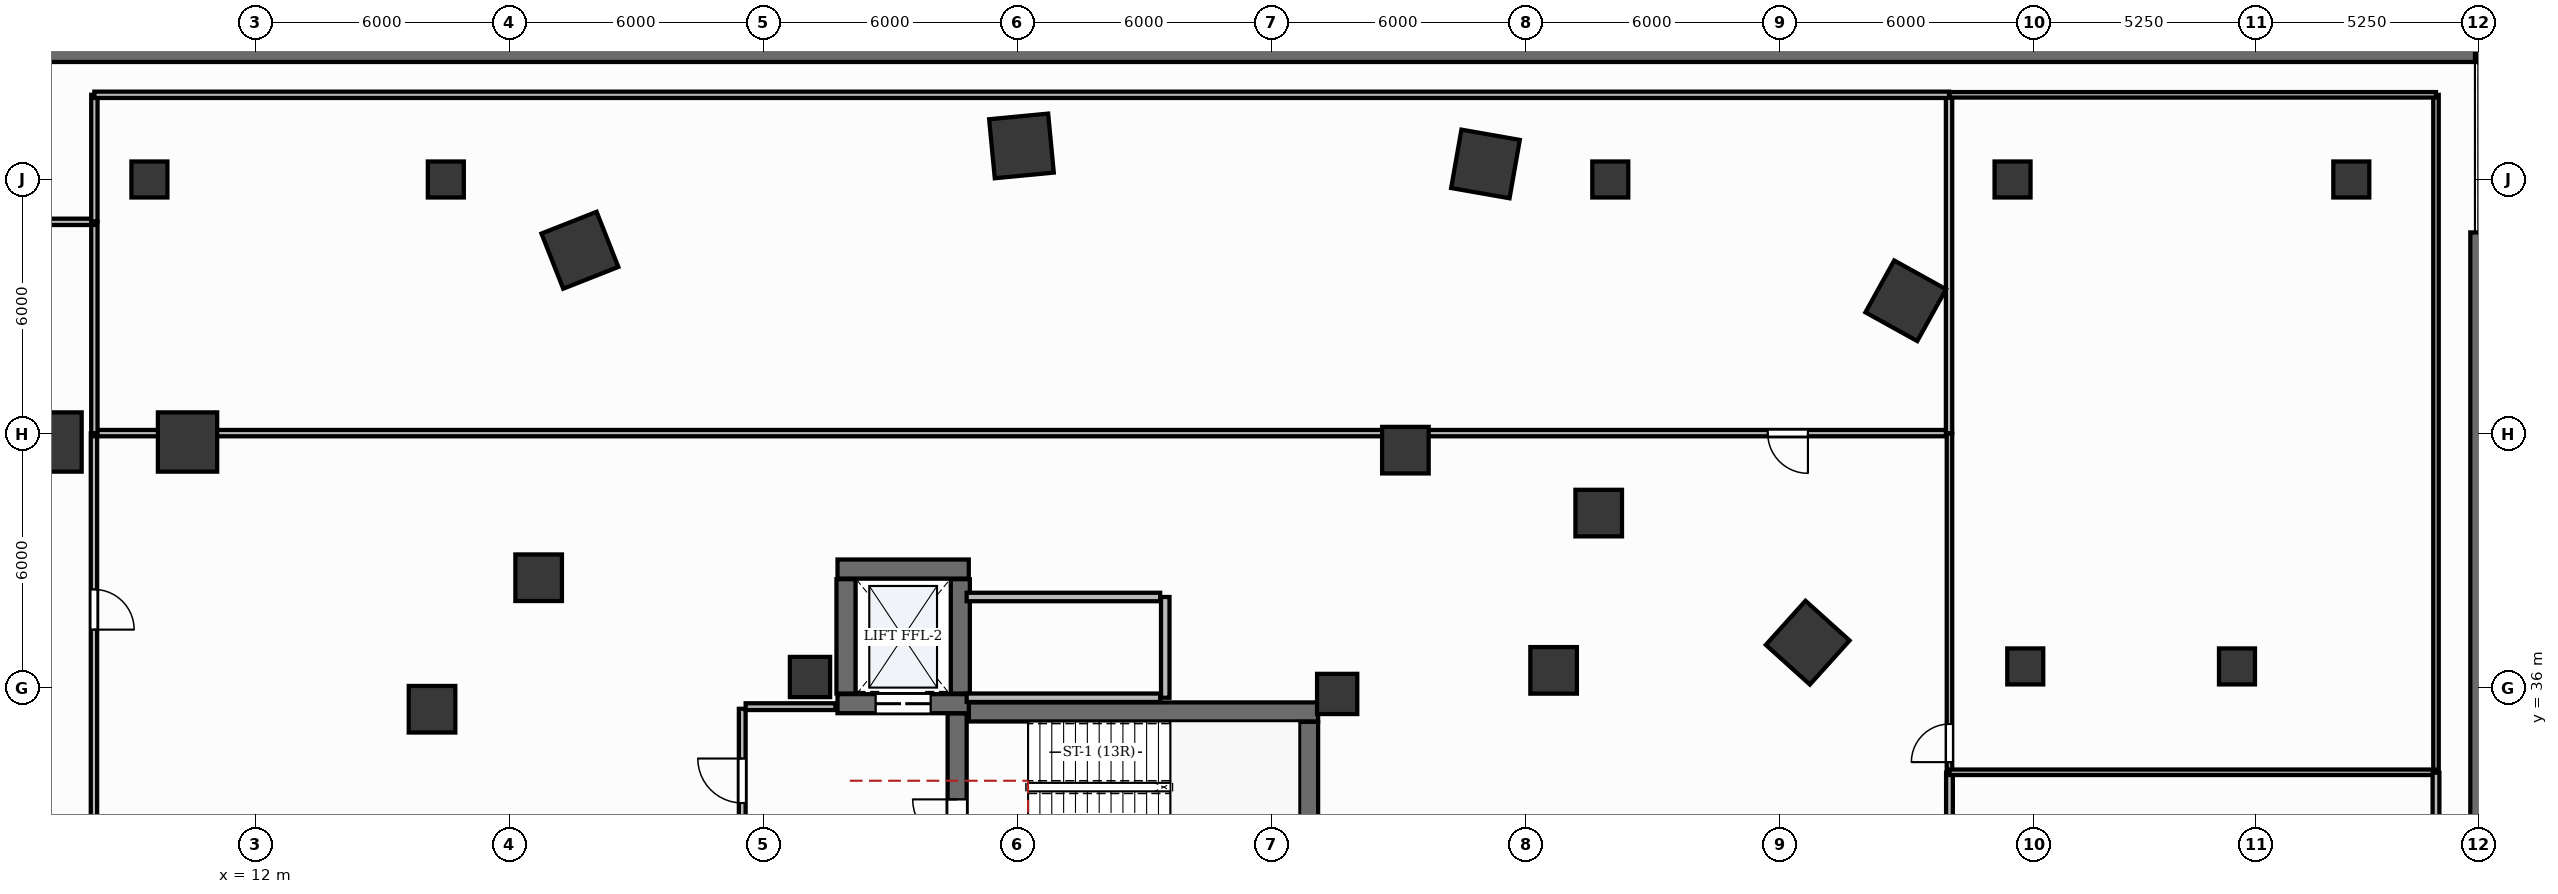
"""IFC4 building model, lengths in metres.
Left out: names, types, materials, properties, quantities, classifications, styles, units other than length and angle.
Written with IfcOpenShell. Run it as: python <this file> out.ifc"""

import sys

from ifc_helpers import new_model, si_unit, direction, frame, frame_2d, origin, origin_2d, place, context, subcontext, project, spatial, rectangle, extrude, element, fill, save


model = new_model("IFC4")
c1 = context("Model", 3, precision=1e-05, world=origin(), true_north=direction((0.0, 1.0)))
c2 = subcontext(c1, "Body", "Model", "MODEL_VIEW")
j1 = project(units=[si_unit("LENGTHUNIT", "METRE"), si_unit("PLANEANGLEUNIT", "RADIAN")], contexts=[c1])
p1 = place(None, origin())
s1 = spatial("IfcSite", under=j1, at=p1, CompositionType="ELEMENT")
p2 = place(p1, origin())
s2 = spatial("IfcBuilding", under=s1, at=p2, CompositionType="ELEMENT")
p3 = place(p2, frame((0.0, 0.0, -4.5)))
s3 = spatial("IfcBuildingStorey", under=s2, at=p3, CompositionType="ELEMENT", Elevation=-4.5)
p4 = place(p3, frame((2.25, 51.0, 0.0), z_axis=(0.0, 0.0, 1.0), x_axis=(1.0, 0.0, 0.0)))
e1 = element("IfcWall", 1, at=p4, inside=s3, PredefinedType="USERDEFINED", context=c2, shape_type="SweptSolid", body=[
    extrude(rectangle(XDim=62.17, YDim=0.45, at=frame_2d((31.085, 0.0))), origin(), (0.0, 0.0, 1.0), 4.182),
])
for number, where, z_axis, x_axis in (
    (2, (9.5, 48.0, 0.0), (0.0, 0.0, 1.0), (1.0, 0.0, 0.0)),
    (3, (16.5, 48.0, 0.0), (0.0, 0.0, 1.0), (1.0, 0.0, 0.0)),
    (4, (44.0, 48.0, 0.0), (0.0, 0.0, 1.0), (1.0, 0.0, 0.0)),
    (5, (53.5, 48.0, 0.0), (0.0, 0.0, 1.0), (1.0, 0.0, 0.0)),
    (6, (61.5, 48.0, 0.0), (0.0, 0.0, 1.0), (1.0, 0.0, 0.0)),
):
    element("IfcColumn", number, at=place(p3, frame(where, z_axis=z_axis, x_axis=x_axis)), inside=s3, PredefinedType="COLUMN", context=c2, shape_type="SweptSolid", body=[
        extrude(rectangle(XDim=0.85, YDim=0.85, at=origin_2d()), origin(), (0.0, 0.0, 1.0), 4.18),
    ])
p5 = place(p3, frame((28.852, 35.425, 0.0), z_axis=(0.0, 0.0, 1.0), x_axis=(1.0, 0.0, 0.0)))
e7 = element("IfcWall", 7, at=p5, inside=s3, PredefinedType="SHEAR", context=c2, shape_type="SweptSolid", body=[
    extrude(rectangle(XDim=8.248, YDim=0.45, at=frame_2d((4.124, 0.0))), origin(), (0.0, 0.0, 1.0), 4.18),
])
p6 = place(p3, frame((36.875, 32.11, 0.0), z_axis=(0.0, 0.0, 1.0), x_axis=(0.0, 1.0, 0.0)))
e8 = element("IfcWall", 8, at=p6, inside=s3, PredefinedType="SHEAR", context=c2, shape_type="SweptSolid", body=[
    extrude(rectangle(XDim=3.08, YDim=0.45, at=frame_2d((1.54, 0.0))), origin(), (0.0, 0.0, 1.0), 4.18),
])
p7 = place(p3, frame((28.575, 32.11, 0.0), z_axis=(0.0, 0.0, 1.0), x_axis=(0.0, 1.0, 0.0)))
e9 = element("IfcWall", 9, at=p7, inside=s3, PredefinedType="SHEAR", context=c2, shape_type="SweptSolid", body=[
    extrude(rectangle(XDim=3.283, YDim=0.45, at=frame_2d((1.642, 0.0))), origin(), (0.0, 0.0, 1.0), 4.18),
])
p8 = place(p7, frame((0.2, 0.0, 0.0)))
e10 = element("IfcOpeningElement", 10, at=p8, cuts=e9, PredefinedType="OPENING", context=c2, shape_type="SweptSolid", body=[
    extrude(rectangle(XDim=1.05, YDim=2.15, at=frame_2d((0.525, 1.075))), frame((0.0, 0.24, 0.0), z_axis=(0.0, -1.0, 0.0), x_axis=(1.0, 0.0, 0.0)), (0.0, 0.0, 1.0), 0.48),
])
p9 = place(p3, frame((25.75, 38.8, 0.0), z_axis=(0.0, 0.0, 1.0), x_axis=(1.0, 0.0, 0.0)))
e11 = element("IfcWall", 11, at=p9, inside=s3, PredefinedType="SHEAR", context=c2, shape_type="SweptSolid", body=[
    extrude(rectangle(XDim=3.1, YDim=0.45, at=frame_2d((1.55, 0.0))), origin(), (0.0, 0.0, 1.0), 4.18),
])
p10 = place(p3, frame((25.75, 35.62, 0.0), z_axis=(0.0, 0.0, 1.0), x_axis=(1.0, 0.0, 0.0)))
e12 = element("IfcWall", 12, at=p10, inside=s3, PredefinedType="SHEAR", context=c2, shape_type="SweptSolid", body=[
    extrude(rectangle(XDim=3.1, YDim=0.45, at=frame_2d((1.55, 0.0))), origin(), (0.0, 0.0, 1.0), 4.18),
])
p11 = place(p10, frame((0.9, 0.0, 0.0)))
e13 = element("IfcOpeningElement", 13, at=p11, cuts=e12, PredefinedType="OPENING", context=c2, shape_type="SweptSolid", body=[
    extrude(rectangle(XDim=1.3, YDim=2.2, at=frame_2d((0.65, 1.1))), frame((0.0, 0.24, 0.0), z_axis=(0.0, -1.0, 0.0), x_axis=(1.0, 0.0, 0.0)), (0.0, 0.0, 1.0), 0.48),
])
for number, where, z_axis, x_axis in (
    (14, (25.95, 35.86, 0.0), (0.0, 0.0, 1.0), (0.0, 1.0, 0.0)),
    (15, (28.65, 35.86, 0.0), (0.0, 0.0, 1.0), (0.0, 1.0, 0.0)),
):
    element("IfcWall", number, at=place(p3, frame(where, z_axis=z_axis, x_axis=x_axis)), inside=s3, PredefinedType="SHEAR", context=c2, shape_type="SweptSolid", body=[
        extrude(rectangle(XDim=2.7, YDim=0.45, at=frame_2d((1.35, 0.0))), origin(), (0.0, 0.0, 1.0), 4.18),
    ])
for number, where, z_axis, x_axis in (
    (16, (37.55, 35.85, -0.0), (0.0, 0.0, 1.0), (1.0, 0.0, 0.0)),
    (17, (25.1, 36.25, -0.0), (0.0, 0.0, 1.0), (1.0, 0.0, 0.0)),
):
    element("IfcColumn", number, at=place(p3, frame(where, z_axis=z_axis, x_axis=x_axis)), inside=s3, PredefinedType="PILASTER", context=c2, shape_type="SweptSolid", body=[
        extrude(rectangle(XDim=0.95, YDim=0.95, at=origin_2d()), origin(), (0.0, 0.0, 1.0), 4.181),
    ])
for number, where, z_axis, x_axis in (
    (18, (7.2, 41.8, 0.0), (0.0, 0.0, 1.0), (1.0, 0.0, 0.0)),
    (19, (10.4, 41.8, 0.0), (0.0, 0.0, 1.0), (1.0, 0.0, 0.0)),
    (20, (50.977, 45.135, 0.0), (0.0, 0.0, 1.0), (-0.875, 0.485, 0.0)),
    (21, (41.052, 48.367, 0.0), (0.0, 0.0, 1.0), (-0.985, 0.173, 0.0)),
    (22, (30.094, 48.792, 0.0), (0.0, 0.0, 1.0), (0.995, 0.095, 0.0)),
    (23, (19.667, 46.329, 0.0), (0.0, 0.0, 1.0), (0.93, 0.367, 0.0)),
    (24, (48.662, 37.061, 0.0), (0.0, 0.0, 1.0), (0.669, 0.743, 0.0)),
):
    element("IfcColumn", number, at=place(p3, frame(where, z_axis=z_axis, x_axis=x_axis)), inside=s3, PredefinedType="COLUMN", context=c2, shape_type="SweptSolid", body=[
        extrude(rectangle(XDim=1.4, YDim=1.4, at=origin_2d()), origin(), (0.0, 0.0, 1.0), 4.18),
    ])
for number, where, z_axis, x_axis in (
    (25, (43.727, 40.121, 0.0), (0.0, 0.0, 1.0), (1.0, 0.0, 0.0)),
    (26, (39.161, 41.608, 0.0), (0.0, 0.0, 1.0), (1.0, 0.0, 0.0)),
    (27, (18.692, 38.595, 0.0), (0.0, 0.0, 1.0), (1.0, 0.0, 0.0)),
    (28, (16.174, 35.489, 0.0), (0.0, 0.0, 1.0), (1.0, 0.0, 0.0)),
    (29, (42.662, 36.407, 0.0), (0.0, 0.0, 1.0), (1.0, 0.0, 0.0)),
):
    element("IfcColumn", number, at=place(p3, frame(where, z_axis=z_axis, x_axis=x_axis)), inside=s3, PredefinedType="COLUMN", context=c2, shape_type="SweptSolid", body=[
        extrude(rectangle(XDim=1.1, YDim=1.1, at=origin_2d()), origin(), (0.0, 0.0, 1.0), 4.18),
    ])
p12 = place(p3, frame((64.5, 10.45, 0.0), z_axis=(0.0, 0.0, 1.0), x_axis=(0.0, 1.0, 0.0)))
e30 = element("IfcWall", 30, at=p12, inside=s3, PredefinedType="SHEAR", context=c2, shape_type="SweptSolid", body=[
    extrude(rectangle(XDim=36.3, YDim=0.38, at=frame_2d((18.15, 0.0))), origin(), (0.0, 0.0, 1.0), 4.18),
])
for number, where, z_axis, x_axis in (
    (31, (58.8, 36.5, 0.0), (0.0, 0.0, 1.0), (1.0, 0.0, 0.0)),
    (32, (53.8, 36.5, 0.0), (0.0, 0.0, 1.0), (1.0, 0.0, 0.0)),
):
    element("IfcColumn", number, at=place(p3, frame(where, z_axis=z_axis, x_axis=x_axis)), inside=s3, PredefinedType="COLUMN", context=c2, shape_type="SweptSolid", body=[
        extrude(rectangle(XDim=0.85, YDim=0.85, at=origin_2d()), origin(), (0.0, 0.0, 1.0), 4.18),
    ])
p13 = place(p3, frame((33.49, 35.76, 0.0), z_axis=(0.0, 0.0, 1.0), x_axis=(0.0, 1.0, 0.0)))
e33 = element("IfcWall", 33, at=p13, inside=s3, PredefinedType="PARTITIONING", context=c2, shape_type="SweptSolid", body=[
    extrude(rectangle(XDim=2.38, YDim=0.2, at=frame_2d((1.19, 0.0))), origin(), (0.0, 0.0, 1.0), 3.04),
])
for number, where, z_axis, x_axis in (
    (34, (28.8, 35.76, 0.0), (0.0, 0.0, 1.0), (1.0, 0.0, 0.0)),
    (35, (28.8, 38.14, 0.0), (0.0, 0.0, 1.0), (1.0, 0.0, 0.0)),
):
    element("IfcWall", number, at=place(p3, frame(where, z_axis=z_axis, x_axis=x_axis)), inside=s3, PredefinedType="PARTITIONING", context=c2, shape_type="SweptSolid", body=[
        extrude(rectangle(XDim=4.57, YDim=0.2, at=frame_2d((2.285, 0.0))), origin(), (0.0, 0.0, 1.0), 3.04),
    ])
p14 = place(p3, frame((23.5, 32.1, 0.0), z_axis=(0.0, 0.0, 1.0), x_axis=(0.0, 1.0, 0.0)))
e36 = element("IfcWall", 36, at=p14, inside=s3, PredefinedType="PARTITIONING", context=c2, shape_type="SweptSolid", body=[
    extrude(rectangle(XDim=3.4, YDim=0.16, at=frame_2d((1.7, 0.0))), origin(), (0.0, 0.0, 1.0), 3.04),
])
p15 = place(p14, frame((1.175, 0.0, 0.0)))
e37 = element("IfcOpeningElement", 37, at=p15, cuts=e36, PredefinedType="OPENING", context=c2, shape_type="SweptSolid", body=[
    extrude(rectangle(XDim=1.05, YDim=2.15, at=frame_2d((0.525, 1.075))), frame((0.0, 0.095, 0.0), z_axis=(0.0, -1.0, 0.0), x_axis=(1.0, 0.0, 0.0)), (0.0, 0.0, 1.0), 0.19),
])
p16 = place(p3, frame((23.58, 35.55, 0.0), z_axis=(0.0, 0.0, 1.0), x_axis=(1.0, 0.0, 0.0)))
e38 = element("IfcWall", 38, at=p16, inside=s3, PredefinedType="PARTITIONING", context=c2, shape_type="SweptSolid", body=[
    extrude(rectangle(XDim=2.12, YDim=0.16, at=frame_2d((1.06, 0.0))), origin(), (0.0, 0.0, 1.0), 3.04),
])
p17 = place(p3, frame((8.19, 42.0, 0.0), z_axis=(0.0, 0.0, 1.0), x_axis=(0.0, -1.0, 0.0)))
e39 = element("IfcWall", 39, at=p17, inside=s3, PredefinedType="PARTITIONING", context=c2, shape_type="SweptSolid", body=[
    extrude(rectangle(XDim=31.0, YDim=0.15, at=frame_2d((15.5, 0.0))), origin(), (0.0, 0.0, 1.0), 3.04),
])
p18 = place(p17, frame((3.681, 0.0, 0.0)))
e40 = element("IfcOpeningElement", 40, at=p18, cuts=e39, PredefinedType="OPENING", context=c2, shape_type="SweptSolid", body=[
    extrude(rectangle(XDim=0.95, YDim=2.15, at=frame_2d((0.475, 1.075))), frame((0.0, 0.09, 0.0), z_axis=(0.0, -1.0, 0.0), x_axis=(1.0, 0.0, 0.0)), (0.0, 0.0, 1.0), 0.18),
])
p19 = place(p3, frame((52.0, 42.01, 0.0), z_axis=(0.0, 0.0, 1.0), x_axis=(-1.0, 0.0, 0.0)))
e41 = element("IfcWall", 41, at=p19, inside=s3, PredefinedType="PARTITIONING", context=c2, shape_type="SweptSolid", body=[
    extrude(rectangle(XDim=43.79, YDim=0.15, at=frame_2d((21.895, 0.0))), origin(), (0.0, 0.0, 1.0), 3.04),
])
p20 = place(p19, frame((3.333, 0.0, 0.0)))
e42 = element("IfcOpeningElement", 42, at=p20, cuts=e41, PredefinedType="OPENING", context=c2, shape_type="SweptSolid", body=[
    extrude(rectangle(XDim=0.95, YDim=2.15, at=frame_2d((0.475, 1.075))), frame((0.0, 0.09, 0.0), z_axis=(0.0, -1.0, 0.0), x_axis=(1.0, 0.0, 0.0)), (0.0, 0.0, 1.0), 0.18),
])
p21 = place(p3, frame((52.01, 34.0, 0.0), z_axis=(0.0, 0.0, 1.0), x_axis=(0.0, 1.0, 0.0)))
e43 = element("IfcWall", 43, at=p21, inside=s3, PredefinedType="PARTITIONING", context=c2, shape_type="SweptSolid", body=[
    extrude(rectangle(XDim=8.0, YDim=0.13, at=frame_2d((4.0, 0.0))), origin(), (0.0, 0.0, 1.0), 3.04),
])
p22 = place(p21, frame((0.24, 0.0, 0.0)))
e44 = element("IfcOpeningElement", 44, at=p22, cuts=e43, PredefinedType="OPENING", context=c2, shape_type="SweptSolid", body=[
    extrude(rectangle(XDim=0.9, YDim=2.15, at=frame_2d((0.45, 1.075))), frame((0.0, 0.08, 0.0), z_axis=(0.0, -1.0, 0.0), x_axis=(1.0, 0.0, 0.0)), (0.0, 0.0, 1.0), 0.16),
])
p23 = place(p3, frame((52.01, 18.0, 0.0), z_axis=(0.0, 0.0, 1.0), x_axis=(0.0, 1.0, 0.0)))
e45 = element("IfcWall", 45, at=p23, inside=s3, PredefinedType="PARTITIONING", context=c2, shape_type="SweptSolid", body=[
    extrude(rectangle(XDim=15.99, YDim=0.16, at=frame_2d((7.995, 0.0))), origin(), (0.0, 0.0, 1.0), 3.04),
])
p24 = place(p23, frame((0.95, 0.0, 0.0)))
e46 = element("IfcOpeningElement", 46, at=p24, cuts=e45, PredefinedType="OPENING", context=c2, shape_type="SweptSolid", body=[
    extrude(rectangle(XDim=0.95, YDim=2.15, at=frame_2d((0.475, 1.075))), frame((0.0, 0.095, 0.0), z_axis=(0.0, -1.0, 0.0), x_axis=(1.0, 0.0, 0.0)), (0.0, 0.0, 1.0), 0.19),
])
p25 = place(p3, frame((8.2, 47.0, 0.0), z_axis=(0.0, 0.0, 1.0), x_axis=(0.0, -1.0, 0.0)))
e47 = element("IfcWall", 47, at=p25, inside=s3, PredefinedType="PARTITIONING", context=c2, shape_type="SweptSolid", body=[
    extrude(rectangle(XDim=4.99, YDim=0.15, at=frame_2d((2.495, 0.0))), origin(), (0.0, 0.0, 1.0), 3.04),
])
p26 = place(p3, frame((3.0, 47.0, 0.0), z_axis=(0.0, 0.0, 1.0), x_axis=(1.0, 0.0, 0.0)))
e48 = element("IfcWall", 48, at=p26, inside=s3, PredefinedType="PARTITIONING", context=c2, shape_type="SweptSolid", body=[
    extrude(rectangle(XDim=5.2, YDim=0.15, at=frame_2d((2.6, 0.0))), origin(), (0.0, 0.0, 1.0), 3.04),
])
p27 = place(p3, frame((52.0, 50.0, 0.0), z_axis=(0.0, 0.0, 1.0), x_axis=(0.0, -1.0, 0.0)))
e49 = element("IfcWall", 49, at=p27, inside=s3, PredefinedType="PARTITIONING", context=c2, shape_type="SweptSolid", body=[
    extrude(rectangle(XDim=7.99, YDim=0.15, at=frame_2d((3.995, 0.0))), origin(), (0.0, 0.0, 1.0), 3.04),
])
p28 = place(p3, frame((8.2, 47.01, 0.0), z_axis=(0.0, 0.0, 1.0), x_axis=(0.0, 1.0, 0.0)))
e50 = element("IfcWall", 50, at=p28, inside=s3, PredefinedType="PARTITIONING", context=c2, shape_type="SweptSolid", body=[
    extrude(rectangle(XDim=2.99, YDim=0.15, at=frame_2d((1.495, 0.0))), origin(), (0.0, 0.0, 1.0), 3.04),
])
p29 = place(p3, frame((8.2, 50.0, 0.0), z_axis=(0.0, 0.0, 1.0), x_axis=(1.0, 0.0, 0.0)))
e51 = element("IfcWall", 51, at=p29, inside=s3, PredefinedType="PARTITIONING", context=c2, shape_type="SweptSolid", body=[
    extrude(rectangle(XDim=43.8, YDim=0.15, at=frame_2d((21.9, 0.0))), origin(), (0.0, 0.0, 1.0), 3.04),
])
p30 = place(p3, frame((63.5, 50.0, 0.0), z_axis=(0.0, 0.0, 1.0), x_axis=(0.0, -1.0, 0.0)))
e52 = element("IfcWall", 52, at=p30, inside=s3, PredefinedType="PARTITIONING", context=c2, shape_type="SweptSolid", body=[
    extrude(rectangle(XDim=16.0, YDim=0.13, at=frame_2d((8.0, 0.0))), origin(), (0.0, 0.0, 1.0), 3.04),
])
for number, where, z_axis, x_axis in (
    (53, (63.5, 34.0, 0.0), (0.0, 0.0, 1.0), (-1.0, 0.0, 0.0)),
    (54, (52.01, 50.0, 0.0), (0.0, 0.0, 1.0), (1.0, 0.0, 0.0)),
):
    element("IfcWall", number, at=place(p3, frame(where, z_axis=z_axis, x_axis=x_axis)), inside=s3, PredefinedType="PARTITIONING", context=c2, shape_type="SweptSolid", body=[
        extrude(rectangle(XDim=11.49, YDim=0.13, at=frame_2d((5.745, 0.0))), origin(), (0.0, 0.0, 1.0), 3.04),
    ])
p31 = place(p3, frame((63.5, 33.99, 0.0), z_axis=(0.0, 0.0, 1.0), x_axis=(0.0, -1.0, 0.0)))
e55 = element("IfcWall", 55, at=p31, inside=s3, PredefinedType="PARTITIONING", context=c2, shape_type="SweptSolid", body=[
    extrude(rectangle(XDim=15.99, YDim=0.16, at=frame_2d((7.995, 0.0))), origin(), (0.0, 0.0, 1.0), 3.04),
])
p32 = place(p8, origin())
e56 = element("IfcDoor", 56, at=p32, inside=s3, OperationType="SINGLE_SWING_RIGHT", PredefinedType="DOOR", context=c2, shape_type="SweptSolid", body=[
    extrude(rectangle(XDim=1.05, YDim=2.15, at=frame_2d((0.525, 1.075))), frame((0.0, 0.025, 0.0), z_axis=(0.0, -1.0, 0.0), x_axis=(1.0, 0.0, 0.0)), (0.0, 0.0, 1.0), 0.05),
])
fill(e10, e56)
p33 = place(p11, origin())
e57 = element("IfcDoor", 57, at=p33, inside=s3, OperationType="DOUBLE_DOOR_SLIDING", PredefinedType="DOOR", context=c2, shape_type="SweptSolid", body=[
    extrude(rectangle(XDim=1.3, YDim=2.2, at=frame_2d((0.65, 1.1))), frame((0.0, 0.025, 0.0), z_axis=(0.0, -1.0, 0.0), x_axis=(1.0, 0.0, 0.0)), (0.0, 0.0, 1.0), 0.05),
])
fill(e13, e57)
p34 = place(p15, origin())
e58 = element("IfcDoor", 58, at=p34, inside=s3, OperationType="SINGLE_SWING_RIGHT", PredefinedType="DOOR", context=c2, shape_type="SweptSolid", body=[
    extrude(rectangle(XDim=1.05, YDim=2.15, at=frame_2d((0.525, 1.075))), frame((0.0, 0.025, 0.0), z_axis=(0.0, -1.0, 0.0), x_axis=(1.0, 0.0, 0.0)), (0.0, 0.0, 1.0), 0.05),
])
fill(e37, e58)
p35 = place(p18, origin())
e59 = element("IfcDoor", 59, at=p35, inside=s3, OperationType="SINGLE_SWING_RIGHT", PredefinedType="DOOR", context=c2, shape_type="SweptSolid", body=[
    extrude(rectangle(XDim=0.95, YDim=2.15, at=frame_2d((0.475, 1.075))), frame((0.0, 0.025, 0.0), z_axis=(0.0, -1.0, 0.0), x_axis=(1.0, 0.0, 0.0)), (0.0, 0.0, 1.0), 0.05),
])
fill(e40, e59)
p36 = place(p20, origin())
e60 = element("IfcDoor", 60, at=p36, inside=s3, OperationType="SINGLE_SWING_LEFT", PredefinedType="DOOR", context=c2, shape_type="SweptSolid", body=[
    extrude(rectangle(XDim=0.95, YDim=2.15, at=frame_2d((0.475, 1.075))), frame((0.0, 0.025, 0.0), z_axis=(0.0, -1.0, 0.0), x_axis=(1.0, 0.0, 0.0)), (0.0, 0.0, 1.0), 0.05),
])
fill(e42, e60)
p37 = place(p22, origin())
e61 = element("IfcDoor", 61, at=p37, inside=s3, OperationType="SINGLE_SWING_LEFT", PredefinedType="DOOR", context=c2, shape_type="SweptSolid", body=[
    extrude(rectangle(XDim=0.9, YDim=2.15, at=frame_2d((0.45, 1.075))), frame((0.0, 0.025, 0.0), z_axis=(0.0, -1.0, 0.0), x_axis=(1.0, 0.0, 0.0)), (0.0, 0.0, 1.0), 0.05),
])
fill(e44, e61)
save(model, sys.argv[1])
